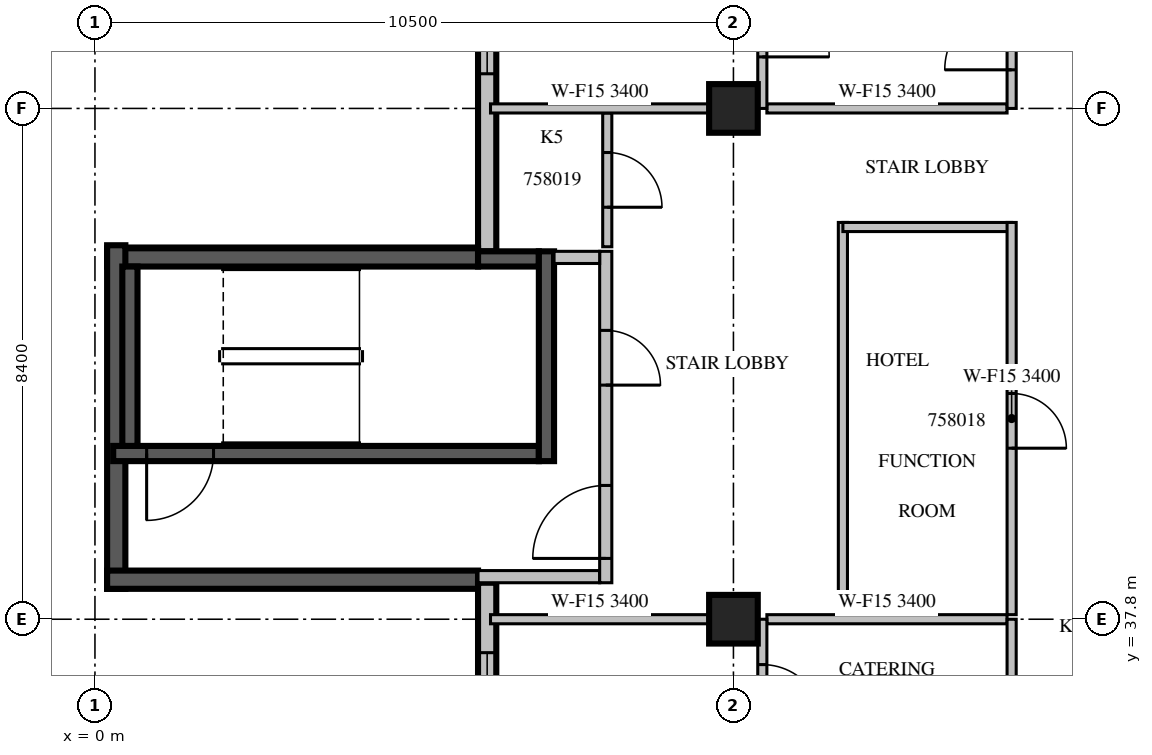
"""IFC4 building model, lengths in metres.
Left out: names, types, materials, properties, quantities, classifications, styles, units other than length and angle.
Written with IfcOpenShell. Run it as: python <this file> out.ifc"""

import sys

from ifc_helpers import new_model, si_unit, direction, frame, frame_2d, origin, origin_2d, place, context, subcontext, project, spatial, rectangle, extrude, source, transform, mapped, element, fill, save


model = new_model("IFC4")
c1 = context("Model", 3, precision=1e-05, world=origin(), true_north=direction((0.0, 1.0)))
c2 = subcontext(c1, "Body", "Model", "MODEL_VIEW")
j1 = project(units=[si_unit("LENGTHUNIT", "METRE"), si_unit("PLANEANGLEUNIT", "RADIAN")], contexts=[c1])
p1 = place(None, origin())
s1 = spatial("IfcSite", under=j1, at=p1, CompositionType="ELEMENT")
p2 = place(p1, origin())
s2 = spatial("IfcBuilding", under=s1, at=p2, CompositionType="ELEMENT")
p3 = place(p2, frame((0.0, 0.0, 253.8)))
s3 = spatial("IfcBuildingStorey", under=s2, at=p3, CompositionType="ELEMENT", Elevation=253.8)
m1 = source(origin(), c2, "Body", "SweptSolid", [
    extrude(rectangle(XDim=0.8, YDim=0.8, at=origin_2d()), origin(), (0.0, 0.0, 1.0), 3.8),
])
for number, where, z_axis, x_axis in (
    (1, (10.5, 37.8, 0.0), (0.0, 0.0, 1.0), (1.0, 0.0, 0.0)),
    (2, (10.5, 46.2, 0.0), (0.0, 0.0, 1.0), (1.0, 0.0, 0.0)),
):
    element("IfcColumn", number, at=place(p3, frame(where, z_axis=z_axis, x_axis=x_axis)), inside=s3, PredefinedType="COLUMN", context=c2, shape_type="MappedRepresentation", body=[
        mapped(m1, transform((0.0, 0.0, 0.0), scale=1.0)),
    ])
m2 = source(origin(), c2, "Body", "SweptSolid", [
    extrude(rectangle(XDim=9.91, YDim=0.3, at=frame_2d((4.955, 0.0))), origin(), (0.0, 0.0, 1.0), 3.4),
])
p4 = place(p3, frame((6.45, 53.76, 0.0), z_axis=(0.0, 0.0, 1.0), x_axis=(0.0, -1.0, 0.0)))
e3 = element("IfcWall", 3, at=p4, inside=s3, PredefinedType="STANDARD", context=c2, shape_type="MappedRepresentation", body=[
    mapped(m2, transform((0.0, 0.0, 0.0), scale=1.0)),
])
m3 = source(origin(), c2, "Body", "SweptSolid", [
    extrude(rectangle(XDim=3.6, YDim=2.3, at=frame_2d((1.8, 1.15))), frame((0.0, 0.16, 0.0), z_axis=(0.0, -1.0, 0.0), x_axis=(1.0, 0.0, 0.0)), (0.0, 0.0, 1.0), 0.32),
])
p5 = place(p4, frame((3.39, 0.0, 0.6)))
e4 = element("IfcOpeningElement", 4, at=p5, cuts=e3, PredefinedType="OPENING", context=c2, shape_type="MappedRepresentation", body=[
    mapped(m3, transform((0.0, 0.0, 0.0), scale=1.0)),
])
m4 = source(origin(), c2, "Body", "SweptSolid", [
    extrude(rectangle(XDim=2.4, YDim=2.3, at=frame_2d((1.2, 1.15))), frame((0.0, 0.16, 0.0), z_axis=(0.0, -1.0, 0.0), x_axis=(1.0, 0.0, 0.0)), (0.0, 0.0, 1.0), 0.32),
])
p6 = place(p4, frame((0.495, 0.0, 0.6)))
e5 = element("IfcOpeningElement", 5, at=p6, cuts=e3, PredefinedType="OPENING", context=c2, shape_type="MappedRepresentation", body=[
    mapped(m4, transform((0.0, 0.0, 0.0), scale=1.0)),
])
m5 = source(origin(), c2, "Body", "SweptSolid", [
    extrude(rectangle(XDim=6.1, YDim=0.3, at=frame_2d((3.05, 0.0))), origin(), (0.0, 0.0, 1.0), 3.4),
])
p7 = place(p3, frame((6.3, 43.75, 0.0), z_axis=(0.0, 0.0, 1.0), x_axis=(-1.0, 0.0, 0.0)))
e6 = element("IfcWall", 6, at=p7, inside=s3, PredefinedType="SOLIDWALL", context=c2, shape_type="MappedRepresentation", body=[
    mapped(m5, transform((0.0, 0.0, 0.0), scale=1.0)),
])
m6 = source(origin(), c2, "Body", "SweptSolid", [
    extrude(rectangle(XDim=5.65, YDim=0.3, at=frame_2d((2.825, 0.0))), origin(), (0.0, 0.0, 1.0), 3.4),
])
p8 = place(p3, frame((0.35, 43.95, 0.0), z_axis=(0.0, 0.0, 1.0), x_axis=(0.0, -1.0, 0.0)))
e7 = element("IfcWall", 7, at=p8, inside=s3, PredefinedType="SOLIDWALL", context=c2, shape_type="MappedRepresentation", body=[
    mapped(m6, transform((0.0, 0.0, 0.0), scale=1.0)),
])
p9 = place(p3, frame((0.2, 38.45, 0.0), z_axis=(0.0, 0.0, 1.0), x_axis=(1.0, 0.0, 0.0)))
e8 = element("IfcWall", 8, at=p9, inside=s3, PredefinedType="SOLIDWALL", context=c2, shape_type="MappedRepresentation", body=[
    mapped(m5, transform((0.0, 0.0, 0.0), scale=1.0)),
])
m7 = source(origin(), c2, "Body", "SweptSolid", [
    extrude(rectangle(XDim=16.6, YDim=0.3, at=frame_2d((8.3, 0.0))), origin(), (0.0, 0.0, 1.0), 3.4),
])
p10 = place(p3, frame((6.45, 38.4, 0.0), z_axis=(0.0, 0.0, 1.0), x_axis=(0.0, -1.0, 0.0)))
e9 = element("IfcWall", 9, at=p10, inside=s3, PredefinedType="STANDARD", context=c2, shape_type="MappedRepresentation", body=[
    mapped(m7, transform((0.0, 0.0, 0.0), scale=1.0)),
])
m8 = source(origin(), c2, "Body", "SweptSolid", [
    extrude(rectangle(XDim=1.8, YDim=2.3, at=frame_2d((0.9, 1.15))), frame((0.0, 0.16, 0.0), z_axis=(0.0, -1.0, 0.0), x_axis=(1.0, 0.0, 0.0)), (0.0, 0.0, 1.0), 0.32),
])
p11 = place(p10, frame((1.15, 0.0, 0.6)))
e10 = element("IfcOpeningElement", 10, at=p11, cuts=e9, PredefinedType="OPENING", context=c2, shape_type="MappedRepresentation", body=[
    mapped(m8, transform((0.0, 0.0, 0.0), scale=1.0)),
])
p12 = place(p10, frame((9.438, 0.0, 0.6)))
e11 = element("IfcOpeningElement", 11, at=p12, cuts=e9, PredefinedType="OPENING", context=c2, shape_type="MappedRepresentation", body=[
    mapped(m8, transform((0.0, 0.0, 0.0), scale=1.0)),
])
m9 = source(origin(), c2, "Body", "SweptSolid", [
    extrude(rectangle(XDim=3.0, YDim=2.3, at=frame_2d((1.5, 1.15))), frame((0.0, 0.16, 0.0), z_axis=(0.0, -1.0, 0.0), x_axis=(1.0, 0.0, 0.0)), (0.0, 0.0, 1.0), 0.32),
])
p13 = place(p10, frame((12.7, 0.0, 0.6)))
e12 = element("IfcOpeningElement", 12, at=p13, cuts=e9, PredefinedType="OPENING", context=c2, shape_type="MappedRepresentation", body=[
    mapped(m9, transform((0.0, 0.0, 0.0), scale=1.0)),
])
m10 = source(origin(), c2, "Body", "SweptSolid", [
    extrude(rectangle(XDim=1.0, YDim=2.1, at=frame_2d((0.5, 1.05))), frame((0.0, 0.16, 0.0), z_axis=(0.0, -1.0, 0.0), x_axis=(1.0, 0.0, 0.0)), (0.0, 0.0, 1.0), 0.32),
])
p14 = place(p10, frame((5.45, 0.0, 0.0)))
e13 = element("IfcOpeningElement", 13, at=p14, cuts=e9, PredefinedType="OPENING", context=c2, shape_type="MappedRepresentation", body=[
    mapped(m10, transform((0.0, 0.0, 0.0), scale=1.0)),
])
m11 = source(origin(), c2, "Body", "SweptSolid", [
    extrude(rectangle(XDim=7.0, YDim=0.25, at=frame_2d((3.5, 0.0))), origin(), (0.0, 0.0, 1.0), 3.4),
])
p15 = place(p3, frame((0.3, 40.525, 0.0), z_axis=(0.0, 0.0, 1.0), x_axis=(1.0, 0.0, 0.0)))
e14 = element("IfcWall", 14, at=p15, inside=s3, PredefinedType="SOLIDWALL", context=c2, shape_type="MappedRepresentation", body=[
    mapped(m11, transform((0.0, 0.0, 0.0), scale=1.0)),
])
m12 = source(origin(), c2, "Body", "SweptSolid", [
    extrude(rectangle(XDim=1.1, YDim=2.1, at=frame_2d((0.55, 1.05))), frame((0.0, 0.135, 0.0), z_axis=(0.0, -1.0, 0.0), x_axis=(1.0, 0.0, 0.0)), (0.0, 0.0, 1.0), 0.27),
])
p16 = place(p15, frame((0.55, 0.0, 0.0)))
e15 = element("IfcOpeningElement", 15, at=p16, cuts=e14, PredefinedType="OPENING", context=c2, shape_type="MappedRepresentation", body=[
    mapped(m12, transform((0.0, 0.0, 0.0), scale=1.0)),
])
m13 = source(origin(), c2, "Body", "SweptSolid", [
    extrude(rectangle(XDim=1.0, YDim=0.25, at=frame_2d((0.5, 0.0))), origin(), (0.0, 0.0, 1.0), 3.4),
])
p17 = place(p3, frame((6.3, 43.725, 0.0), z_axis=(0.0, 0.0, 1.0), x_axis=(1.0, 0.0, 0.0)))
e16 = element("IfcWall", 16, at=p17, inside=s3, PredefinedType="SOLIDWALL", context=c2, shape_type="MappedRepresentation", body=[
    mapped(m13, transform((0.0, 0.0, 0.0), scale=1.0)),
])
m14 = source(origin(), c2, "Body", "SweptSolid", [
    extrude(rectangle(XDim=3.45, YDim=0.25, at=frame_2d((1.725, 0.0))), origin(), (0.0, 0.0, 1.0), 3.4),
])
p18 = place(p3, frame((7.425, 40.4, 0.0), z_axis=(0.0, 0.0, 1.0), x_axis=(0.0, 1.0, 0.0)))
e17 = element("IfcWall", 17, at=p18, inside=s3, PredefinedType="SOLIDWALL", context=c2, shape_type="MappedRepresentation", body=[
    mapped(m14, transform((0.0, 0.0, 0.0), scale=1.0)),
])
m15 = source(origin(), c2, "Body", "SweptSolid", [
    extrude(rectangle(XDim=2.95, YDim=0.25, at=frame_2d((1.475, 0.0))), origin(), (0.0, 0.0, 1.0), 3.4),
])
p19 = place(p3, frame((0.575, 40.65, 0.0), z_axis=(0.0, 0.0, 1.0), x_axis=(0.0, 1.0, 0.0)))
e18 = element("IfcWall", 18, at=p19, inside=s3, PredefinedType="SOLIDWALL", context=c2, shape_type="MappedRepresentation", body=[
    mapped(m15, transform((0.0, 0.0, 0.0), scale=1.0)),
])
m16 = source(origin(), c2, "Body", "SweptSolid", [
    extrude(rectangle(XDim=2.0, YDim=0.2, at=frame_2d((1.0, 0.0))), origin(), (0.0, 0.0, 1.0), 3.4),
])
p20 = place(p3, frame((6.3, 38.5, 0.0), z_axis=(0.0, 0.0, 1.0), x_axis=(1.0, 0.0, 0.0)))
e19 = element("IfcWall", 19, at=p20, inside=s3, PredefinedType="PARTITIONING", context=c2, shape_type="MappedRepresentation", body=[
    mapped(m16, transform((0.0, 0.0, 0.0), scale=1.0)),
])
m17 = source(origin(), c2, "Body", "SweptSolid", [
    extrude(rectangle(XDim=5.45, YDim=0.2, at=frame_2d((2.725, 0.0))), origin(), (0.0, 0.0, 1.0), 3.4),
])
p21 = place(p3, frame((8.4, 38.4, 0.0), z_axis=(0.0, 0.0, 1.0), x_axis=(0.0, 1.0, 0.0)))
e20 = element("IfcWall", 20, at=p21, inside=s3, PredefinedType="PARTITIONING", context=c2, shape_type="MappedRepresentation", body=[
    mapped(m17, transform((0.0, 0.0, 0.0), scale=1.0)),
])
m18 = source(origin(), c2, "Body", "SweptSolid", [
    extrude(rectangle(XDim=1.2, YDim=2.1, at=frame_2d((0.6, 1.05))), frame((0.0, 0.11, 0.0), z_axis=(0.0, -1.0, 0.0), x_axis=(1.0, 0.0, 0.0)), (0.0, 0.0, 1.0), 0.22),
])
p22 = place(p21, frame((0.4, 0.0, 0.0)))
e21 = element("IfcOpeningElement", 21, at=p22, cuts=e20, PredefinedType="OPENING", context=c2, shape_type="MappedRepresentation", body=[
    mapped(m18, transform((0.0, 0.0, 0.0), scale=1.0)),
])
m19 = source(origin(), c2, "Body", "SweptSolid", [
    extrude(rectangle(XDim=0.9, YDim=2.1, at=frame_2d((0.45, 1.05))), frame((0.0, 0.11, 0.0), z_axis=(0.0, -1.0, 0.0), x_axis=(1.0, 0.0, 0.0)), (0.0, 0.0, 1.0), 0.22),
])
p23 = place(p21, frame((3.25, 0.0, 0.0)))
e22 = element("IfcOpeningElement", 22, at=p23, cuts=e20, PredefinedType="OPENING", context=c2, shape_type="MappedRepresentation", body=[
    mapped(m19, transform((0.0, 0.0, 0.0), scale=1.0)),
])
m20 = source(origin(), c2, "Body", "SweptSolid", [
    extrude(rectangle(XDim=0.75, YDim=0.2, at=frame_2d((0.375, 0.0))), origin(), (0.0, 0.0, 1.0), 3.4),
])
p24 = place(p3, frame((7.55, 43.75, 0.0), z_axis=(0.0, 0.0, 1.0), x_axis=(1.0, 0.0, 0.0)))
e23 = element("IfcWall", 23, at=p24, inside=s3, PredefinedType="PARTITIONING", context=c2, shape_type="MappedRepresentation", body=[
    mapped(m20, transform((0.0, 0.0, 0.0), scale=1.0)),
])
m21 = source(origin(), c2, "Body", "SweptSolid", [
    extrude(rectangle(XDim=6.45, YDim=0.15, at=frame_2d((3.225, 0.0))), origin(), (0.0, 0.0, 1.0), 3.4),
])
p25 = place(p3, frame((12.3, 44.325, 0.0), z_axis=(0.0, 0.0, 1.0), x_axis=(0.0, -1.0, 0.0)))
e24 = element("IfcWall", 24, at=p25, inside=s3, PredefinedType="PARTITIONING", context=c2, shape_type="MappedRepresentation", body=[
    mapped(m21, transform((0.0, 0.0, 0.0), scale=1.0)),
])
m22 = source(origin(), c2, "Body", "SweptSolid", [
    extrude(rectangle(XDim=2.775, YDim=0.15, at=frame_2d((1.387, 0.0))), origin(), (0.0, 0.0, 1.0), 3.4),
])
p26 = place(p3, frame((15.075, 44.25, 0.0), z_axis=(0.0, 0.0, 1.0), x_axis=(-1.0, 0.0, 0.0)))
e25 = element("IfcWall", 25, at=p26, inside=s3, PredefinedType="PARTITIONING", context=c2, shape_type="MappedRepresentation", body=[
    mapped(m22, transform((0.0, 0.0, 0.0), scale=1.0)),
])
p27 = place(p3, frame((15.075, 37.875, 0.0), z_axis=(0.0, 0.0, 1.0), x_axis=(0.0, 1.0, 0.0)))
e26 = element("IfcWall", 26, at=p27, inside=s3, PredefinedType="PARTITIONING", context=c2, shape_type="MappedRepresentation", body=[
    mapped(m21, transform((0.0, 0.0, 0.0), scale=1.0)),
])
m23 = source(origin(), c2, "Body", "SweptSolid", [
    extrude(rectangle(XDim=0.9, YDim=2.1, at=frame_2d((0.45, 1.05))), frame((0.0, 0.085, 0.0), z_axis=(0.0, -1.0, 0.0), x_axis=(1.0, 0.0, 0.0)), (0.0, 0.0, 1.0), 0.17),
])
p28 = place(p27, frame((2.737, 0.0, 0.0)))
e27 = element("IfcOpeningElement", 27, at=p28, cuts=e26, PredefinedType="OPENING", context=c2, shape_type="MappedRepresentation", body=[
    mapped(m23, transform((0.0, 0.0, 0.0), scale=1.0)),
])
m24 = source(origin(), c2, "Body", "SweptSolid", [
    extrude(rectangle(XDim=2.2, YDim=0.15, at=frame_2d((1.1, 0.0))), origin(), (0.0, 0.0, 1.0), 3.4),
])
p29 = place(p3, frame((8.425, 43.925, 0.0), z_axis=(0.0, 0.0, 1.0), x_axis=(0.0, 1.0, 0.0)))
e28 = element("IfcWall", 28, at=p29, inside=s3, PredefinedType="PARTITIONING", context=c2, shape_type="MappedRepresentation", body=[
    mapped(m24, transform((0.0, 0.0, 0.0), scale=1.0)),
])
p30 = place(p29, frame((0.65, 0.0, 0.0)))
e29 = element("IfcOpeningElement", 29, at=p30, cuts=e28, PredefinedType="OPENING", context=c2, shape_type="MappedRepresentation", body=[
    mapped(m23, transform((0.0, 0.0, 0.0), scale=1.0)),
])
m25 = source(origin(), c2, "Body", "SweptSolid", [
    extrude(rectangle(XDim=3.596, YDim=0.15, at=frame_2d((1.798, 0.0))), origin(), (0.0, 0.0, 1.0), 3.4),
])
p31 = place(p3, frame((10.101, 37.8, 0.0), z_axis=(0.0, 0.0, 1.0), x_axis=(-1.0, 0.0, 0.0)))
e30 = element("IfcWall", 30, at=p31, inside=s3, PredefinedType="PARTITIONING", context=c2, shape_type="MappedRepresentation", body=[
    mapped(m25, transform((0.0, 0.0, 0.0), scale=1.0)),
])
m26 = source(origin(), c2, "Body", "SweptSolid", [
    extrude(rectangle(XDim=3.95, YDim=0.15, at=frame_2d((1.975, 0.0))), origin(), (0.0, 0.0, 1.0), 3.4),
])
p32 = place(p3, frame((15.0, 37.8, 0.0), z_axis=(0.0, 0.0, 1.0), x_axis=(-1.0, 0.0, 0.0)))
e31 = element("IfcWall", 31, at=p32, inside=s3, PredefinedType="PARTITIONING", context=c2, shape_type="MappedRepresentation", body=[
    mapped(m26, transform((0.0, 0.0, 0.0), scale=1.0)),
])
m27 = source(origin(), c2, "Body", "SweptSolid", [
    extrude(rectangle(XDim=8.4, YDim=0.15, at=frame_2d((4.2, 0.0))), origin(), (0.0, 0.0, 1.0), 2.9),
])
p33 = place(p3, frame((10.975, 29.4, 0.0), z_axis=(0.0, 0.0, 1.0), x_axis=(0.0, 1.0, 0.0)))
e32 = element("IfcWall", 32, at=p33, inside=s3, PredefinedType="PARTITIONING", context=c2, shape_type="MappedRepresentation", body=[
    mapped(m27, transform((0.0, 0.0, 0.0), scale=1.0)),
])
m28 = source(origin(), c2, "Body", "SweptSolid", [
    extrude(rectangle(XDim=1.6, YDim=2.1, at=frame_2d((0.8, 1.05))), frame((0.0, 0.085, 0.0), z_axis=(0.0, -1.0, 0.0), x_axis=(1.0, 0.0, 0.0)), (0.0, 0.0, 1.0), 0.17),
])
p34 = place(p33, frame((1.424, 0.0, 0.0)))
e33 = element("IfcOpeningElement", 33, at=p34, cuts=e32, PredefinedType="OPENING", context=c2, shape_type="MappedRepresentation", body=[
    mapped(m28, transform((0.0, 0.0, 0.0), scale=1.0)),
])
m29 = source(origin(), c2, "Body", "SweptSolid", [
    extrude(rectangle(XDim=1.0, YDim=2.1, at=frame_2d((0.5, 1.05))), frame((0.0, 0.085, 0.0), z_axis=(0.0, -1.0, 0.0), x_axis=(1.0, 0.0, 0.0)), (0.0, 0.0, 1.0), 0.17),
])
p35 = place(p33, frame((4.678, 0.0, 0.0)))
e34 = element("IfcOpeningElement", 34, at=p35, cuts=e32, PredefinedType="OPENING", context=c2, shape_type="MappedRepresentation", body=[
    mapped(m29, transform((0.0, 0.0, 0.0), scale=1.0)),
])
p36 = place(p33, frame((6.654, 0.0, 0.0)))
e35 = element("IfcOpeningElement", 35, at=p36, cuts=e32, PredefinedType="OPENING", context=c2, shape_type="MappedRepresentation", body=[
    mapped(m29, transform((0.0, 0.0, 0.0), scale=1.0)),
])
p37 = place(p3, frame((10.101, 46.2, 0.0), z_axis=(0.0, 0.0, 1.0), x_axis=(-1.0, 0.0, 0.0)))
e36 = element("IfcWall", 36, at=p37, inside=s3, PredefinedType="PARTITIONING", context=c2, shape_type="MappedRepresentation", body=[
    mapped(m25, transform((0.0, 0.0, 0.0), scale=1.0)),
])
p38 = place(p3, frame((15.0, 46.2, 0.0), z_axis=(0.0, 0.0, 1.0), x_axis=(-1.0, 0.0, 0.0)))
e37 = element("IfcWall", 37, at=p38, inside=s3, PredefinedType="PARTITIONING", context=c2, shape_type="MappedRepresentation", body=[
    mapped(m26, transform((0.0, 0.0, 0.0), scale=1.0)),
])
m30 = source(origin(), c2, "Body", "SweptSolid", [
    extrude(rectangle(XDim=7.26, YDim=0.15, at=frame_2d((3.63, 0.0))), origin(), (0.0, 0.0, 1.0), 3.4),
])
p39 = place(p3, frame((10.975, 46.2, 0.0), z_axis=(0.0, 0.0, 1.0), x_axis=(0.0, 1.0, 0.0)))
e38 = element("IfcWall", 38, at=p39, inside=s3, PredefinedType="PARTITIONING", context=c2, shape_type="MappedRepresentation", body=[
    mapped(m30, transform((0.0, 0.0, 0.0), scale=1.0)),
])
m31 = source(origin(), c2, "Body", "SweptSolid", [
    extrude(rectangle(XDim=1.1, YDim=2.1, at=frame_2d((0.55, 1.05))), frame((0.0, 0.085, 0.0), z_axis=(0.0, -1.0, 0.0), x_axis=(1.0, 0.0, 0.0)), (0.0, 0.0, 1.0), 0.17),
])
p40 = place(p39, frame((0.847, 0.0, 0.0)))
e39 = element("IfcOpeningElement", 39, at=p40, cuts=e38, PredefinedType="OPENING", context=c2, shape_type="MappedRepresentation", body=[
    mapped(m31, transform((0.0, 0.0, 0.0), scale=1.0)),
])
p41 = place(p39, frame((2.946, 0.0, 0.0)))
e40 = element("IfcOpeningElement", 40, at=p41, cuts=e38, PredefinedType="OPENING", context=c2, shape_type="MappedRepresentation", body=[
    mapped(m23, transform((0.0, 0.0, 0.0), scale=1.0)),
])
p42 = place(p39, frame((4.529, 0.0, 0.0)))
e41 = element("IfcOpeningElement", 41, at=p42, cuts=e38, PredefinedType="OPENING", context=c2, shape_type="MappedRepresentation", body=[
    mapped(m23, transform((0.0, 0.0, 0.0), scale=1.0)),
])
p43 = place(p3, frame((15.075, 29.4, 0.0), z_axis=(0.0, 0.0, 1.0), x_axis=(0.0, 1.0, 0.0)))
e42 = element("IfcWall", 42, at=p43, inside=s3, PredefinedType="PARTITIONING", context=c2, shape_type="MappedRepresentation", body=[
    mapped(m27, transform((0.0, 0.0, 0.0), scale=1.0)),
])
p44 = place(p43, frame((1.211, 0.0, 0.0)))
e43 = element("IfcOpeningElement", 43, at=p44, cuts=e42, PredefinedType="OPENING", context=c2, shape_type="MappedRepresentation", body=[
    mapped(m28, transform((0.0, 0.0, 0.0), scale=1.0)),
])
p45 = place(p43, frame((4.678, 0.0, 0.0)))
e44 = element("IfcOpeningElement", 44, at=p45, cuts=e42, PredefinedType="OPENING", context=c2, shape_type="MappedRepresentation", body=[
    mapped(m23, transform((0.0, 0.0, 0.0), scale=1.0)),
])
p46 = place(p3, frame((15.075, 46.2, 0.0), z_axis=(0.0, 0.0, 1.0), x_axis=(0.0, 1.0, 0.0)))
e45 = element("IfcWall", 45, at=p46, inside=s3, PredefinedType="PARTITIONING", context=c2, shape_type="MappedRepresentation", body=[
    mapped(m30, transform((0.0, 0.0, 0.0), scale=1.0)),
])
p47 = place(p46, frame((0.635, 0.0, 0.0)))
e46 = element("IfcOpeningElement", 46, at=p47, cuts=e45, PredefinedType="OPENING", context=c2, shape_type="MappedRepresentation", body=[
    mapped(m31, transform((0.0, 0.0, 0.0), scale=1.0)),
])
m32 = source(origin(), c2, "Body", "SweptSolid", [
    extrude(rectangle(XDim=3.6, YDim=2.3, at=frame_2d((1.8, 1.15))), frame((0.0, 0.03, 0.0), z_axis=(0.0, -1.0, 0.0), x_axis=(1.0, 0.0, 0.0)), (0.0, 0.0, 1.0), 0.06),
])
p48 = place(p5, origin())
e47 = element("IfcWindow", 47, at=p48, inside=s3, PartitioningType="SINGLE_PANEL", PredefinedType="WINDOW", context=c2, shape_type="MappedRepresentation", body=[
    mapped(m32, transform((0.0, 0.0, 0.0), scale=1.0)),
])
fill(e4, e47)
m33 = source(origin(), c2, "Body", "SweptSolid", [
    extrude(rectangle(XDim=1.8, YDim=2.3, at=frame_2d((0.9, 1.15))), frame((0.0, 0.03, 0.0), z_axis=(0.0, -1.0, 0.0), x_axis=(1.0, 0.0, 0.0)), (0.0, 0.0, 1.0), 0.06),
])
p49 = place(p11, origin())
e48 = element("IfcWindow", 48, at=p49, inside=s3, PartitioningType="SINGLE_PANEL", PredefinedType="WINDOW", context=c2, shape_type="MappedRepresentation", body=[
    mapped(m33, transform((0.0, 0.0, 0.0), scale=1.0)),
])
fill(e10, e48)
m34 = source(origin(), c2, "Body", "SweptSolid", [
    extrude(rectangle(XDim=1.1, YDim=2.1, at=frame_2d((0.55, 1.05))), frame((0.0, 0.025, 0.0), z_axis=(0.0, -1.0, 0.0), x_axis=(1.0, 0.0, 0.0)), (0.0, 0.0, 1.0), 0.05),
])
p50 = place(p16, origin())
e49 = element("IfcDoor", 49, at=p50, inside=s3, OperationType="SINGLE_SWING_RIGHT", PredefinedType="DOOR", context=c2, shape_type="MappedRepresentation", body=[
    mapped(m34, transform((0.0, 0.0, 0.0), scale=1.0)),
])
fill(e15, e49)
m35 = source(origin(), c2, "Body", "SweptSolid", [
    extrude(rectangle(XDim=1.2, YDim=2.1, at=frame_2d((0.6, 1.05))), frame((0.0, 0.025, 0.0), z_axis=(0.0, -1.0, 0.0), x_axis=(1.0, 0.0, 0.0)), (0.0, 0.0, 1.0), 0.05),
])
p51 = place(p22, origin())
e50 = element("IfcDoor", 50, at=p51, inside=s3, OperationType="SINGLE_SWING_LEFT", PredefinedType="DOOR", context=c2, shape_type="MappedRepresentation", body=[
    mapped(m35, transform((0.0, 0.0, 0.0), scale=1.0)),
])
fill(e21, e50)
m36 = source(origin(), c2, "Body", "SweptSolid", [
    extrude(rectangle(XDim=0.9, YDim=2.1, at=frame_2d((0.45, 1.05))), frame((0.0, 0.025, 0.0), z_axis=(0.0, -1.0, 0.0), x_axis=(1.0, 0.0, 0.0)), (0.0, 0.0, 1.0), 0.05),
])
p52 = place(p23, origin())
e51 = element("IfcDoor", 51, at=p52, inside=s3, OperationType="SINGLE_SWING_RIGHT", PredefinedType="DOOR", context=c2, shape_type="MappedRepresentation", body=[
    mapped(m36, transform((0.0, 0.0, 0.0), scale=1.0)),
])
fill(e22, e51)
p53 = place(p28, origin())
e52 = element("IfcDoor", 52, at=p53, inside=s3, OperationType="SINGLE_SWING_RIGHT", PredefinedType="DOOR", context=c2, shape_type="MappedRepresentation", body=[
    mapped(m36, transform((0.0, 0.0, 0.0), scale=1.0)),
])
fill(e27, e52)
p54 = place(p30, origin())
e53 = element("IfcDoor", 53, at=p54, inside=s3, OperationType="SINGLE_SWING_RIGHT", PredefinedType="DOOR", context=c2, shape_type="MappedRepresentation", body=[
    mapped(m36, transform((0.0, 0.0, 0.0), scale=1.0)),
])
fill(e29, e53)
m37 = source(origin(), c2, "Body", "SweptSolid", [
    extrude(rectangle(XDim=1.0, YDim=2.1, at=frame_2d((0.5, 1.05))), frame((0.0, 0.025, 0.0), z_axis=(0.0, -1.0, 0.0), x_axis=(1.0, 0.0, 0.0)), (0.0, 0.0, 1.0), 0.05),
])
p55 = place(p36, origin())
e54 = element("IfcDoor", 54, at=p55, inside=s3, OperationType="SINGLE_SWING_RIGHT", PredefinedType="DOOR", context=c2, shape_type="MappedRepresentation", body=[
    mapped(m37, transform((0.0, 0.0, 0.0), scale=1.0)),
])
fill(e35, e54)
p56 = place(p47, origin())
e55 = element("IfcDoor", 55, at=p56, inside=s3, OperationType="SINGLE_SWING_LEFT", PredefinedType="DOOR", context=c2, shape_type="MappedRepresentation", body=[
    mapped(m34, transform((0.0, 0.0, 0.0), scale=1.0)),
])
fill(e46, e55)
p57 = place(p40, origin())
e56 = element("IfcDoor", 56, at=p57, inside=s3, OperationType="SINGLE_SWING_RIGHT", PredefinedType="DOOR", context=c2, shape_type="MappedRepresentation", body=[
    mapped(m34, transform((0.0, 0.0, 0.0), scale=1.0)),
])
fill(e39, e56)
save(model, sys.argv[1])
